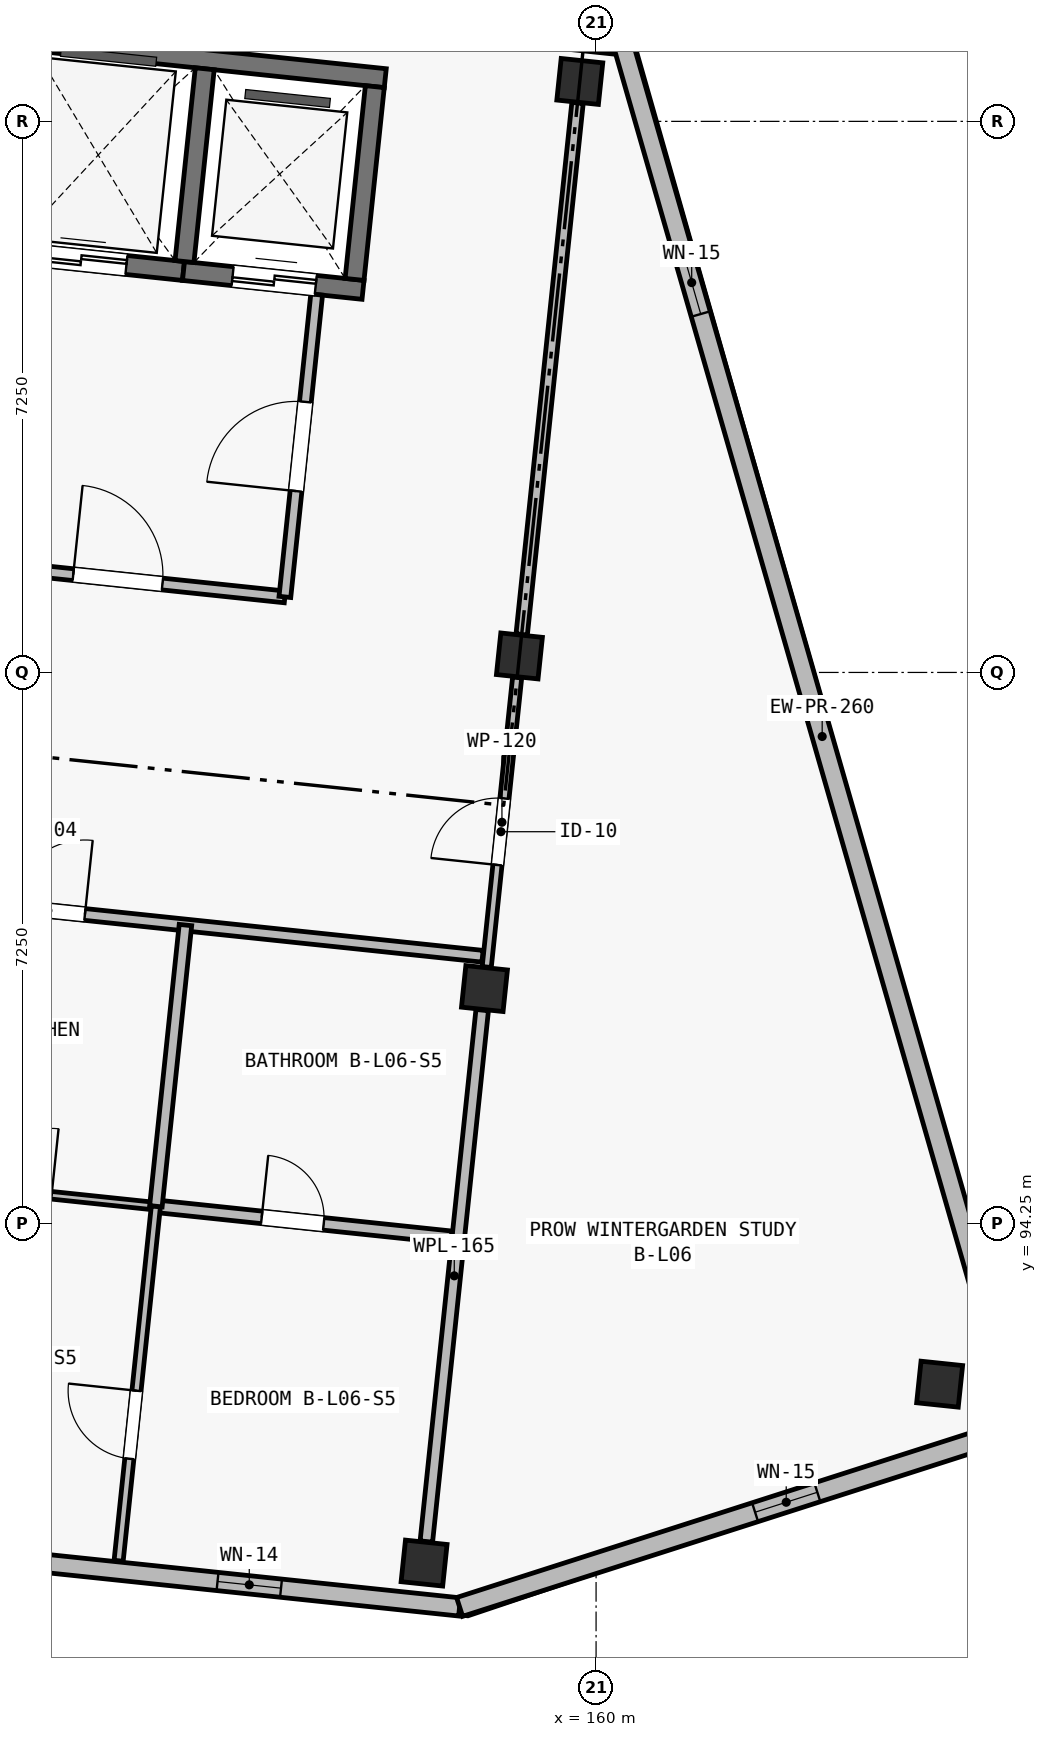
"""IFC4 building model, lengths in metres.
Left out: names, types, materials, properties, quantities, classifications, styles, units other than length and angle.
Written with IfcOpenShell. Run it as: python <this file> out.ifc"""

import sys

from ifc_helpers import new_model, si_unit, direction, frame, frame_2d, origin, origin_2d, place, context, subcontext, project, spatial, rectangle, extrude, element, fill, save


model = new_model("IFC4")
c1 = context("Model", 3, precision=1e-05, world=origin(), true_north=direction((0.0, 1.0)))
c2 = subcontext(c1, "Body", "Model", "MODEL_VIEW")
j1 = project(units=[si_unit("LENGTHUNIT", "METRE"), si_unit("PLANEANGLEUNIT", "RADIAN")], contexts=[c1])
p1 = place(None, origin())
s1 = spatial("IfcSite", under=j1, at=p1, CompositionType="ELEMENT")
p2 = place(p1, origin())
s2 = spatial("IfcBuilding", under=s1, at=p2, CompositionType="ELEMENT")
p3 = place(p2, frame((0.0, 0.0, 21.4)))
s3 = spatial("IfcBuildingStorey", under=s2, at=p3, CompositionType="ELEMENT", Elevation=21.4)
for number, where, z_axis, x_axis in (
    (1, (157.737, 89.783, 0.0), (0.0, 0.0, 1.0), (0.995, -0.105, 0.0)),
    (2, (158.531, 97.341, 0.0), (0.0, 0.0, 1.0), (0.995, -0.105, 0.0)),
    (3, (158.991, 101.717, 0.0), (0.0, 0.0, 1.0), (0.995, -0.105, 0.0)),
    (4, (159.786, 109.275, 0.0), (0.0, 0.0, 1.0), (0.995, -0.105, 0.0)),
    (5, (164.52, 92.136, 0.0), (0.0, 0.0, 1.0), (0.995, -0.105, 0.0)),
):
    element("IfcColumn", number, at=place(p3, frame(where, z_axis=z_axis, x_axis=x_axis)), inside=s3, PredefinedType="COLUMN", context=c2, shape_type="SweptSolid", body=[
        extrude(rectangle(XDim=0.55, YDim=0.55, at=origin_2d()), origin(), (0.0, 0.0, 1.0), 3.25),
    ])
p4 = place(p3, frame((152.204, 109.846, 0.0), z_axis=(0.0, 0.0, 1.0), x_axis=(0.994522922189, -0.104518693261, 0.0)))
e6 = element("IfcWall", 6, at=p4, inside=s3, PredefinedType="SHEAR", context=c2, shape_type="SweptSolid", body=[
    extrude(rectangle(XDim=5.05, YDim=0.25, at=frame_2d((2.525, 0.0))), origin(), (0.0, 0.0, 1.0), 3.25),
])
p5 = place(p3, frame((151.911, 107.061, 0.0), z_axis=(0.0, 0.0, 1.0), x_axis=(0.994524939068, -0.104499500343, 0.0)))
e7 = element("IfcWall", 7, at=p5, inside=s3, PredefinedType="SHEAR", context=c2, shape_type="SweptSolid", body=[
    extrude(rectangle(XDim=2.675, YDim=0.25, at=frame_2d((1.337, 0.0))), origin(), (0.0, 0.0, 1.0), 3.25),
])
p6 = place(p5, frame((0.72, 0.0, 0.0)))
e8 = element("IfcOpeningElement", 8, at=p6, cuts=e7, PredefinedType="OPENING", context=c2, shape_type="SweptSolid", body=[
    extrude(rectangle(XDim=1.2, YDim=2.2, at=frame_2d((0.6, 1.1))), frame((0.0, 0.14, 0.0), z_axis=(0.0, -1.0, 0.0), x_axis=(1.0, 0.0, 0.0)), (0.0, 0.0, 1.0), 0.28),
])
p7 = place(p3, frame((154.572, 106.782, 0.0), z_axis=(0.0, 0.0, 1.0), x_axis=(0.994520650134, -0.1045403102, 0.0)))
e9 = element("IfcWall", 9, at=p7, inside=s3, PredefinedType="SHEAR", context=c2, shape_type="SweptSolid", body=[
    extrude(rectangle(XDim=2.375, YDim=0.25, at=frame_2d((1.188, 0.0))), origin(), (0.0, 0.0, 1.0), 3.25),
])
p8 = place(p7, frame((0.65, 0.0, 0.0)))
e10 = element("IfcOpeningElement", 10, at=p8, cuts=e9, PredefinedType="OPENING", context=c2, shape_type="SweptSolid", body=[
    extrude(rectangle(XDim=1.1, YDim=2.15, at=frame_2d((0.55, 1.075))), frame((0.0, 0.14, 0.0), z_axis=(0.0, -1.0, 0.0), x_axis=(1.0, 0.0, 0.0)), (0.0, 0.0, 1.0), 0.28),
])
p9 = place(p3, frame((154.585, 106.906, 0.0), z_axis=(0.0, 0.0, 1.0), x_axis=(0.104555197931, 0.994519085079, 0.0)))
e11 = element("IfcWall", 11, at=p9, inside=s3, PredefinedType="SHEAR", context=c2, shape_type="SweptSolid", body=[
    extrude(rectangle(XDim=2.55, YDim=0.25, at=frame_2d((1.275, 0.0))), origin(), (0.0, 0.0, 1.0), 3.25),
])
p10 = place(p3, frame((156.822, 106.671, 0.0), z_axis=(0.0, 0.0, 1.0), x_axis=(0.104545242946, 0.99452013161, 0.0)))
e12 = element("IfcWall", 12, at=p10, inside=s3, PredefinedType="SHEAR", context=c2, shape_type="SweptSolid", body=[
    extrude(rectangle(XDim=2.55, YDim=0.25, at=frame_2d((1.275, 0.0))), origin(), (0.0, 0.0, 1.0), 3.25),
])
p11 = place(p3, frame((158.204, 89.206, 0.0), z_axis=(0.0, 0.0, 1.0), x_axis=(-0.994521760736, 0.104529744196, 0.0)))
e13 = element("IfcWall", 13, at=p11, inside=s3, PredefinedType="SOLIDWALL", context=c2, shape_type="SweptSolid", body=[
    extrude(rectangle(XDim=8.525, YDim=0.24, at=frame_2d((4.262, 0.0))), origin(), (0.0, 0.0, 1.0), 3.0),
])
p12 = place(p11, frame((2.362, 0.0, 0.52)))
e14 = element("IfcOpeningElement", 14, at=p12, cuts=e13, PredefinedType="OPENING", context=c2, shape_type="SweptSolid", body=[
    extrude(rectangle(XDim=0.84, YDim=2.28, at=frame_2d((0.42, 1.14))), frame((0.0, 0.135, 0.0), z_axis=(0.0, -1.0, 0.0), x_axis=(1.0, 0.0, 0.0)), (0.0, 0.0, 1.0), 0.27),
])
p13 = place(p11, frame((5.625, 0.0, 0.52)))
e15 = element("IfcOpeningElement", 15, at=p13, cuts=e13, PredefinedType="OPENING", context=c2, shape_type="SweptSolid", body=[
    extrude(rectangle(XDim=0.6, YDim=2.22, at=frame_2d((0.3, 1.11))), frame((0.0, 0.135, 0.0), z_axis=(0.0, -1.0, 0.0), x_axis=(1.0, 0.0, 0.0)), (0.0, 0.0, 1.0), 0.27),
])
p14 = place(p11, frame((7.295, 0.0, 0.42)))
e16 = element("IfcOpeningElement", 16, at=p14, cuts=e13, PredefinedType="OPENING", context=c2, shape_type="SweptSolid", body=[
    extrude(rectangle(XDim=0.62, YDim=2.28, at=frame_2d((0.31, 1.14))), frame((0.0, 0.135, 0.0), z_axis=(0.0, -1.0, 0.0), x_axis=(1.0, 0.0, 0.0)), (0.0, 0.0, 1.0), 0.27),
])
p15 = place(p3, frame((151.885, 110.634, 0.0), z_axis=(0.0, 0.0, 1.0), x_axis=(0.994521760736, -0.104529744196, 0.0)))
e17 = element("IfcWall", 17, at=p15, inside=s3, PredefinedType="SOLIDWALL", context=c2, shape_type="SweptSolid", body=[
    extrude(rectangle(XDim=8.525, YDim=0.24, at=frame_2d((4.262, 0.0))), origin(), (0.0, 0.0, 1.0), 3.0),
])
p16 = place(p3, frame((160.363, 109.742, 0.0), z_axis=(0.0, 0.0, 1.0), x_axis=(0.276322184526, -0.961065060409, 0.0)))
e18 = element("IfcWall", 18, at=p16, inside=s3, PredefinedType="SOLIDWALL", context=c2, shape_type="SweptSolid", body=[
    extrude(rectangle(XDim=18.907, YDim=0.26, at=frame_2d((9.453, 0.0))), origin(), (0.0, 0.0, 1.0), 3.0),
])
p17 = place(p16, frame((2.81, 0.0, 0.45)))
e19 = element("IfcOpeningElement", 19, at=p17, cuts=e18, PredefinedType="OPENING", context=c2, shape_type="SweptSolid", body=[
    extrude(rectangle(XDim=0.86, YDim=2.36, at=frame_2d((0.43, 1.18))), frame((0.0, 0.145, 0.0), z_axis=(0.0, -1.0, 0.0), x_axis=(1.0, 0.0, 0.0)), (0.0, 0.0, 1.0), 0.29),
])
p18 = place(p3, frame((165.587, 91.572, 0.0), z_axis=(0.0, 0.0, 1.0), x_axis=(-0.9522851043, -0.305209895201, 0.0)))
e20 = element("IfcWall", 20, at=p18, inside=s3, PredefinedType="SOLIDWALL", context=c2, shape_type="SweptSolid", body=[
    extrude(rectangle(XDim=7.753, YDim=0.26, at=frame_2d((3.876, 0.0))), origin(), (0.0, 0.0, 1.0), 3.0),
])
p19 = place(p18, frame((2.81, 0.0, 0.45)))
e21 = element("IfcOpeningElement", 21, at=p19, cuts=e20, PredefinedType="OPENING", context=c2, shape_type="SweptSolid", body=[
    extrude(rectangle(XDim=0.86, YDim=2.36, at=frame_2d((0.43, 1.18))), frame((0.0, 0.145, 0.0), z_axis=(0.0, -1.0, 0.0), x_axis=(1.0, 0.0, 0.0)), (0.0, 0.0, 1.0), 0.29),
])
p20 = place(p3, frame((151.53, 102.954, 0.0), z_axis=(0.0, 0.0, 1.0), x_axis=(0.994521251134, -0.104534592565, 0.0)))
e22 = element("IfcWall", 22, at=p20, inside=s3, PredefinedType="PARTITIONING", context=c2, shape_type="SweptSolid", body=[
    extrude(rectangle(XDim=4.4, YDim=0.155, at=frame_2d((2.2, 0.0))), origin(), (0.0, 0.0, 1.0), 2.97),
])
p21 = place(p20, frame((1.6, 0.0, 0.0)))
e23 = element("IfcOpeningElement", 23, at=p21, cuts=e22, PredefinedType="OPENING", context=c2, shape_type="SweptSolid", body=[
    extrude(rectangle(XDim=1.18, YDim=2.15, at=frame_2d((0.59, 1.075))), frame((0.0, 0.093, 0.0), z_axis=(0.0, -1.0, 0.0), x_axis=(1.0, 0.0, 0.0)), (0.0, 0.0, 1.0), 0.185),
])
p22 = place(p3, frame((155.906, 102.494, 0.0), z_axis=(0.0, 0.0, 1.0), x_axis=(0.104494148666, 0.99452550138, 0.0)))
e24 = element("IfcWall", 24, at=p22, inside=s3, PredefinedType="PARTITIONING", context=c2, shape_type="SweptSolid", body=[
    extrude(rectangle(XDim=4.0, YDim=0.155, at=frame_2d((2.0, 0.0))), origin(), (0.0, 0.0, 1.0), 2.97),
])
p23 = place(p22, frame((1.4, 0.0, 0.0)))
e25 = element("IfcOpeningElement", 25, at=p23, cuts=e24, PredefinedType="OPENING", context=c2, shape_type="SweptSolid", body=[
    extrude(rectangle(XDim=1.18, YDim=2.15, at=frame_2d((0.59, 1.075))), frame((0.0, 0.093, 0.0), z_axis=(0.0, -1.0, 0.0), x_axis=(1.0, 0.0, 0.0)), (0.0, 0.0, 1.0), 0.185),
])
p24 = place(p3, frame((158.561, 97.625, 0.0), z_axis=(0.0, 0.0, 1.0), x_axis=(0.104545412893, 0.994520113745, 0.0)))
e26 = element("IfcWall", 26, at=p24, inside=s3, PredefinedType="PARTITIONING", context=c2, shape_type="SweptSolid", body=[
    extrude(rectangle(XDim=3.83, YDim=0.12, at=frame_2d((1.915, 0.0))), origin(), (0.0, 0.0, 1.0), 2.5),
])
p25 = place(p24, frame((1.35, 0.0, 0.0)))
e27 = element("IfcOpeningElement", 27, at=p25, cuts=e26, PredefinedType="OPENING", context=c2, shape_type="SweptSolid", body=[
    extrude(rectangle(XDim=0.88, YDim=2.1, at=frame_2d((0.44, 1.05))), frame((0.0, 0.075, 0.0), z_axis=(0.0, -1.0, 0.0), x_axis=(1.0, 0.0, 0.0)), (0.0, 0.0, 1.0), 0.15),
])
p26 = place(p3, frame((159.021, 102.0, 0.0), z_axis=(0.0, 0.0, 1.0), x_axis=(0.10452931889, 0.994521805438, 0.0)))
e28 = element("IfcWall", 28, at=p26, inside=s3, PredefinedType="PARTITIONING", context=c2, shape_type="SweptSolid", body=[
    extrude(rectangle(XDim=7.03, YDim=0.15, at=frame_2d((3.515, 0.0))), origin(), (0.0, 0.0, 1.0), 2.5),
])
p27 = place(p3, frame((157.767, 90.066, 0.0), z_axis=(0.0, 0.0, 1.0), x_axis=(0.104532929154, 0.994521425975, 0.0)))
e29 = element("IfcWall", 29, at=p27, inside=s3, PredefinedType="PLUMBINGWALL", context=c2, shape_type="SweptSolid", body=[
    extrude(rectangle(XDim=7.03, YDim=0.165, at=frame_2d((3.515, 0.0))), origin(), (0.0, 0.0, 1.0), 2.5),
])
p28 = place(p3, frame((150.903, 98.565, 0.0), z_axis=(0.0, 0.0, 1.0), x_axis=(0.994522762445, -0.104520213258, 0.0)))
e30 = element("IfcWall", 30, at=p28, inside=s3, PredefinedType="PARTITIONING", context=c2, shape_type="SweptSolid", body=[
    extrude(rectangle(XDim=7.645, YDim=0.155, at=frame_2d((3.823, 0.0))), origin(), (0.0, 0.0, 1.0), 2.97),
])
p29 = place(p28, frame((1.405, 0.0, 0.0)))
e31 = element("IfcOpeningElement", 31, at=p29, cuts=e30, PredefinedType="OPENING", context=c2, shape_type="SweptSolid", body=[
    extrude(rectangle(XDim=0.98, YDim=2.15, at=frame_2d((0.49, 1.075))), frame((0.0, 0.093, 0.0), z_axis=(0.0, -1.0, 0.0), x_axis=(1.0, 0.0, 0.0)), (0.0, 0.0, 1.0), 0.185),
])
p30 = place(p3, frame((150.345, 94.883, 0.0), z_axis=(0.0, 0.0, 1.0), x_axis=(0.994524375082, -0.104504867671, 0.0)))
e32 = element("IfcWall", 32, at=p30, inside=s3, PredefinedType="PARTITIONING", context=c2, shape_type="SweptSolid", body=[
    extrude(rectangle(XDim=3.885, YDim=0.1, at=frame_2d((1.942, 0.0))), origin(), (0.0, 0.0, 1.0), 2.97),
])
p31 = place(p30, frame((1.625, 0.0, 0.0)))
e33 = element("IfcOpeningElement", 33, at=p31, cuts=e32, PredefinedType="OPENING", context=c2, shape_type="SweptSolid", body=[
    extrude(rectangle(XDim=0.88, YDim=2.1, at=frame_2d((0.44, 1.05))), frame((0.0, 0.065, 0.0), z_axis=(0.0, -1.0, 0.0), x_axis=(1.0, 0.0, 0.0)), (0.0, 0.0, 1.0), 0.13),
])
p32 = place(p3, frame((154.208, 94.477, 0.0), z_axis=(0.0, 0.0, 1.0), x_axis=(0.994521863919, -0.104528762491, 0.0)))
e34 = element("IfcWall", 34, at=p32, inside=s3, PredefinedType="PLUMBINGWALL", context=c2, shape_type="SweptSolid", body=[
    extrude(rectangle(XDim=3.91, YDim=0.165, at=frame_2d((1.955, 0.0))), origin(), (0.0, 0.0, 1.0), 2.97),
])
p33 = place(p32, frame((1.4, 0.0, 0.0)))
e35 = element("IfcOpeningElement", 35, at=p33, cuts=e34, PredefinedType="OPENING", context=c2, shape_type="SweptSolid", body=[
    extrude(rectangle(XDim=0.82, YDim=2.08, at=frame_2d((0.41, 1.04))), frame((0.0, 0.097, 0.0), z_axis=(0.0, -1.0, 0.0), x_axis=(1.0, 0.0, 0.0)), (0.0, 0.0, 1.0), 0.195),
])
p34 = place(p3, frame((153.718, 89.813, 0.0), z_axis=(0.0, 0.0, 1.0), x_axis=(0.104527618124, 0.994521984196, 0.0)))
e36 = element("IfcWall", 36, at=p34, inside=s3, PredefinedType="PARTITIONING", context=c2, shape_type="SweptSolid", body=[
    extrude(rectangle(XDim=4.69, YDim=0.12, at=frame_2d((2.345, 0.0))), origin(), (0.0, 0.0, 1.0), 2.97),
])
p35 = place(p34, frame((1.35, 0.0, 0.0)))
e37 = element("IfcOpeningElement", 37, at=p35, cuts=e36, PredefinedType="OPENING", context=c2, shape_type="SweptSolid", body=[
    extrude(rectangle(XDim=0.9, YDim=2.1, at=frame_2d((0.45, 1.05))), frame((0.0, 0.075, 0.0), z_axis=(0.0, -1.0, 0.0), x_axis=(1.0, 0.0, 0.0)), (0.0, 0.0, 1.0), 0.15),
])
p36 = place(p3, frame((154.208, 94.477, 0.0), z_axis=(0.0, 0.0, 1.0), x_axis=(0.104486626828, 0.994526291666, 0.0)))
e38 = element("IfcWall", 38, at=p36, inside=s3, PredefinedType="PLUMBINGWALL", context=c2, shape_type="SweptSolid", body=[
    extrude(rectangle(XDim=3.72, YDim=0.165, at=frame_2d((1.86, 0.0))), origin(), (0.0, 0.0, 1.0), 2.97),
])
p37 = place(p12, origin())
e39 = element("IfcWindow", 39, at=p37, inside=s3, PartitioningType="SINGLE_PANEL", PredefinedType="WINDOW", context=c2, shape_type="SweptSolid", body=[
    extrude(rectangle(XDim=0.84, YDim=2.28, at=frame_2d((0.42, 1.14))), frame((0.0, 0.03, 0.0), z_axis=(0.0, -1.0, 0.0), x_axis=(1.0, 0.0, 0.0)), (0.0, 0.0, 1.0), 0.06),
])
fill(e14, e39)
p38 = place(p17, origin())
e40 = element("IfcWindow", 40, at=p38, inside=s3, PartitioningType="SINGLE_PANEL", PredefinedType="WINDOW", context=c2, shape_type="SweptSolid", body=[
    extrude(rectangle(XDim=0.86, YDim=2.36, at=frame_2d((0.43, 1.18))), frame((0.0, 0.03, 0.0), z_axis=(0.0, -1.0, 0.0), x_axis=(1.0, 0.0, 0.0)), (0.0, 0.0, 1.0), 0.06),
])
fill(e19, e40)
p39 = place(p19, origin())
e41 = element("IfcWindow", 41, at=p39, inside=s3, PartitioningType="SINGLE_PANEL", PredefinedType="WINDOW", context=c2, shape_type="SweptSolid", body=[
    extrude(rectangle(XDim=0.86, YDim=2.36, at=frame_2d((0.43, 1.18))), frame((0.0, 0.03, 0.0), z_axis=(0.0, -1.0, 0.0), x_axis=(1.0, 0.0, 0.0)), (0.0, 0.0, 1.0), 0.06),
])
fill(e21, e41)
p40 = place(p21, origin())
e42 = element("IfcDoor", 42, at=p40, inside=s3, OperationType="SINGLE_SWING_LEFT", PredefinedType="DOOR", context=c2, shape_type="SweptSolid", body=[
    extrude(rectangle(XDim=1.18, YDim=2.15, at=frame_2d((0.59, 1.075))), frame((0.0, 0.025, 0.0), z_axis=(0.0, -1.0, 0.0), x_axis=(1.0, 0.0, 0.0)), (0.0, 0.0, 1.0), 0.05),
])
fill(e23, e42)
p41 = place(p23, origin())
e43 = element("IfcDoor", 43, at=p41, inside=s3, OperationType="SINGLE_SWING_LEFT", PredefinedType="DOOR", context=c2, shape_type="SweptSolid", body=[
    extrude(rectangle(XDim=1.18, YDim=2.15, at=frame_2d((0.59, 1.075))), frame((0.0, 0.025, 0.0), z_axis=(0.0, -1.0, 0.0), x_axis=(1.0, 0.0, 0.0)), (0.0, 0.0, 1.0), 0.05),
])
fill(e25, e43)
p42 = place(p25, origin())
e44 = element("IfcDoor", 44, at=p42, inside=s3, OperationType="SINGLE_SWING_LEFT", PredefinedType="DOOR", context=c2, shape_type="SweptSolid", body=[
    extrude(rectangle(XDim=0.88, YDim=2.1, at=frame_2d((0.44, 1.05))), frame((0.0, 0.025, 0.0), z_axis=(0.0, -1.0, 0.0), x_axis=(1.0, 0.0, 0.0)), (0.0, 0.0, 1.0), 0.05),
])
fill(e27, e44)
p43 = place(p29, origin())
e45 = element("IfcDoor", 45, at=p43, inside=s3, OperationType="SINGLE_SWING_RIGHT", PredefinedType="DOOR", context=c2, shape_type="SweptSolid", body=[
    extrude(rectangle(XDim=0.98, YDim=2.15, at=frame_2d((0.49, 1.075))), frame((0.0, 0.025, 0.0), z_axis=(0.0, -1.0, 0.0), x_axis=(1.0, 0.0, 0.0)), (0.0, 0.0, 1.0), 0.05),
])
fill(e31, e45)
p44 = place(p33, origin())
e46 = element("IfcDoor", 46, at=p44, inside=s3, OperationType="SINGLE_SWING_LEFT", PredefinedType="DOOR", context=c2, shape_type="SweptSolid", body=[
    extrude(rectangle(XDim=0.82, YDim=2.08, at=frame_2d((0.41, 1.04))), frame((0.0, 0.025, 0.0), z_axis=(0.0, -1.0, 0.0), x_axis=(1.0, 0.0, 0.0)), (0.0, 0.0, 1.0), 0.05),
])
fill(e35, e46)
p45 = place(p35, origin())
e47 = element("IfcDoor", 47, at=p45, inside=s3, OperationType="SINGLE_SWING_RIGHT", PredefinedType="DOOR", context=c2, shape_type="SweptSolid", body=[
    extrude(rectangle(XDim=0.9, YDim=2.1, at=frame_2d((0.45, 1.05))), frame((0.0, 0.025, 0.0), z_axis=(0.0, -1.0, 0.0), x_axis=(1.0, 0.0, 0.0)), (0.0, 0.0, 1.0), 0.05),
])
fill(e37, e47)
p46 = place(p6, origin())
e48 = element("IfcDoor", 48, at=p46, inside=s3, OperationType="DOUBLE_DOOR_SLIDING", PredefinedType="DOOR", context=c2, shape_type="SweptSolid", body=[
    extrude(rectangle(XDim=1.2, YDim=2.2, at=frame_2d((0.6, 1.1))), frame((0.0, 0.025, 0.0), z_axis=(0.0, -1.0, 0.0), x_axis=(1.0, 0.0, 0.0)), (0.0, 0.0, 1.0), 0.05),
])
fill(e8, e48)
p47 = place(p8, origin())
e49 = element("IfcDoor", 49, at=p47, inside=s3, OperationType="DOUBLE_DOOR_SLIDING", PredefinedType="DOOR", context=c2, shape_type="SweptSolid", body=[
    extrude(rectangle(XDim=1.1, YDim=2.15, at=frame_2d((0.55, 1.075))), frame((0.0, 0.025, 0.0), z_axis=(0.0, -1.0, 0.0), x_axis=(1.0, 0.0, 0.0)), (0.0, 0.0, 1.0), 0.05),
])
fill(e10, e49)
save(model, sys.argv[1])
